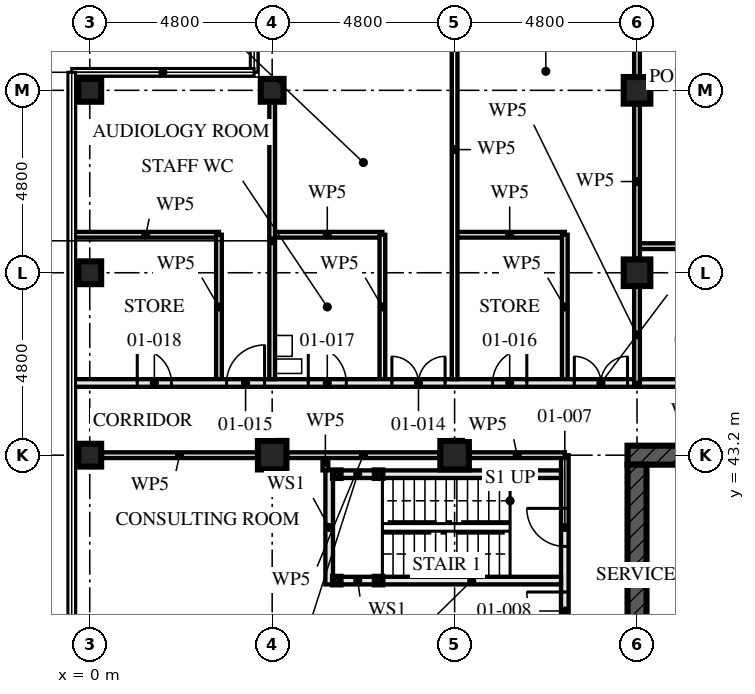
"""IFC4 building model, lengths in metres.
Left out: names, types, materials, properties, quantities, classifications, styles, units other than length and angle.
Written with IfcOpenShell. Run it as: python <this file> out.ifc"""

import sys

from ifc_helpers import new_model, si_unit, direction, frame, frame_2d, origin, origin_2d, place, context, subcontext, project, spatial, rectangle, hollow_rectangle, extrude, element, fill, save


model = new_model("IFC4")
c1 = context("Model", 3, precision=1e-05, world=origin(), true_north=direction((0.0, 1.0)))
c2 = subcontext(c1, "Body", "Model", "MODEL_VIEW")
j1 = project(units=[si_unit("LENGTHUNIT", "METRE"), si_unit("PLANEANGLEUNIT", "RADIAN")], contexts=[c1])
p1 = place(None, origin())
s1 = spatial("IfcSite", under=j1, at=p1, CompositionType="ELEMENT")
p2 = place(p1, origin())
s2 = spatial("IfcBuilding", under=s1, at=p2, CompositionType="ELEMENT")
p3 = place(p2, frame((0.0, 0.0, 4.5)))
s3 = spatial("IfcBuildingStorey", under=s2, at=p3, CompositionType="ELEMENT", Elevation=4.5)
for number, where, z_axis, x_axis in (
    (1, (0.0, 43.2, 0.0), (0.0, 0.0, 1.0), (0.0, 1.0, 0.0)),
    (2, (0.0, 48.0, 0.0), (0.0, 0.0, 1.0), (1.0, 0.0, 0.0)),
    (3, (0.0, 52.8, 0.0), (0.0, 0.0, 1.0), (0.0, 1.0, 0.0)),
):
    element("IfcColumn", number, at=place(p3, frame(where, z_axis=z_axis, x_axis=x_axis)), inside=s3, PredefinedType="COLUMN", context=c2, shape_type="SweptSolid", body=[
        extrude(hollow_rectangle(XDim=0.6, YDim=0.6, WallThickness=0.08, at=origin_2d()), origin(), (0.0, 0.0, 1.0), 4.5),
    ])
p4 = place(p3, frame((4.8, 43.2, 0.0), z_axis=(0.0, 0.0, 1.0), x_axis=(0.0, 1.0, 0.0)))
e4 = element("IfcColumn", 4, at=p4, inside=s3, PredefinedType="COLUMN", context=c2, shape_type="SweptSolid", body=[
    extrude(hollow_rectangle(XDim=0.75, YDim=0.75, WallThickness=0.08, at=origin_2d()), origin(), (0.0, 0.0, 1.0), 4.5),
])
p5 = place(p3, frame((4.8, 52.8, 0.0), z_axis=(0.0, 0.0, 1.0), x_axis=(0.0, 1.0, 0.0)))
e5 = element("IfcColumn", 5, at=p5, inside=s3, PredefinedType="COLUMN", context=c2, shape_type="SweptSolid", body=[
    extrude(hollow_rectangle(XDim=0.6, YDim=0.6, WallThickness=0.08, at=origin_2d()), origin(), (0.0, 0.0, 1.0), 4.5),
])
p6 = place(p3, frame((9.6, 43.2, 0.0), z_axis=(0.0, 0.0, 1.0), x_axis=(0.0, 1.0, 0.0)))
e6 = element("IfcColumn", 6, at=p6, inside=s3, PredefinedType="COLUMN", context=c2, shape_type="SweptSolid", body=[
    extrude(hollow_rectangle(XDim=0.75, YDim=0.75, WallThickness=0.08, at=origin_2d()), origin(), (0.0, 0.0, 1.0), 4.5),
])
for number, where, z_axis, x_axis in (
    (7, (14.4, 48.0, 0.0), (0.0, 0.0, 1.0), (1.0, 0.0, 0.0)),
    (8, (14.4, 52.8, 0.0), (0.0, 0.0, 1.0), (1.0, 0.0, 0.0)),
):
    element("IfcColumn", number, at=place(p3, frame(where, z_axis=z_axis, x_axis=x_axis)), inside=s3, PredefinedType="COLUMN", context=c2, shape_type="SweptSolid", body=[
        extrude(hollow_rectangle(XDim=0.7, YDim=0.7, WallThickness=0.06, at=origin_2d()), origin(), (0.0, 0.0, 1.0), 4.5),
    ])
p7 = place(p3, frame((29.05, 43.2, -0.17), z_axis=(0.0, 0.0, 1.0), x_axis=(-1.0, 0.0, 0.0)))
e9 = element("IfcWall", 9, at=p7, inside=s3, PredefinedType="SHEAR", context=c2, shape_type="SweptSolid", body=[
    extrude(rectangle(XDim=14.9, YDim=0.5, at=frame_2d((7.45, 0.0))), origin(), (0.0, 0.0, 1.0), 4.5),
])
p8 = place(p7, frame((6.85, 0.0, 0.17)))
e10 = element("IfcOpeningElement", 10, at=p8, cuts=e9, PredefinedType="OPENING", context=c2, shape_type="SweptSolid", body=[
    extrude(rectangle(XDim=1.2, YDim=2.1, at=frame_2d((0.6, 1.05))), frame((0.0, 0.26, 0.0), z_axis=(0.0, -1.0, 0.0), x_axis=(1.0, 0.0, 0.0)), (0.0, 0.0, 1.0), 0.521),
])
p9 = place(p3, frame((14.4, 42.95, -0.17), z_axis=(0.0, 0.0, 1.0), x_axis=(0.0, -1.0, 0.0)))
e11 = element("IfcWall", 11, at=p9, inside=s3, PredefinedType="SHEAR", context=c2, shape_type="SweptSolid", body=[
    extrude(rectangle(XDim=13.9, YDim=0.5, at=frame_2d((6.95, 0.0))), origin(), (0.0, 0.0, 1.0), 4.5),
])
p10 = place(p9, frame((6.35, 0.0, 0.17)))
e12 = element("IfcOpeningElement", 12, at=p10, cuts=e11, PredefinedType="OPENING", context=c2, shape_type="SweptSolid", body=[
    extrude(rectangle(XDim=1.2, YDim=2.1, at=frame_2d((0.6, 1.05))), frame((0.0, 0.26, 0.0), z_axis=(0.0, -1.0, 0.0), x_axis=(1.0, 0.0, 0.0)), (0.0, 0.0, 1.0), 0.521),
])
for number, where, z_axis, x_axis in (
    (13, (6.5, 42.7, 0.0), (0.0, 0.0, 1.0), (1.0, 0.0, 0.0)),
    (14, (6.5, 39.9, 0.0), (0.0, 0.0, 1.0), (1.0, 0.0, 0.0)),
    (15, (7.6, 42.7, 0.0), (0.0, 0.0, 1.0), (1.0, 0.0, 0.0)),
    (16, (7.6, 39.9, 0.0), (0.0, 0.0, 1.0), (1.0, 0.0, 0.0)),
):
    element("IfcColumn", number, at=place(p3, frame(where, z_axis=z_axis, x_axis=x_axis)), inside=s3, PredefinedType="COLUMN", context=c2, shape_type="SweptSolid", body=[
        extrude(hollow_rectangle(XDim=0.2, YDim=0.2, WallThickness=0.008, at=origin_2d()), origin(), (0.0, 0.0, 1.0), 4.33),
    ])
p11 = place(p3, frame((6.6, 42.7, 0.0), z_axis=(0.0, 0.0, 1.0), x_axis=(1.0, 0.0, 0.0)))
e17 = element("IfcWall", 17, at=p11, inside=s3, PredefinedType="SOLIDWALL", context=c2, shape_type="SweptSolid", body=[
    extrude(rectangle(XDim=0.9, YDim=0.2, at=frame_2d((0.45, 0.0))), origin(), (0.0, 0.0, 1.0), 3.99),
])
p12 = place(p3, frame((7.7, 42.7, 0.0), z_axis=(0.0, 0.0, 1.0), x_axis=(1.0, 0.0, 0.0)))
e18 = element("IfcWall", 18, at=p12, inside=s3, PredefinedType="SOLIDWALL", context=c2, shape_type="SweptSolid", body=[
    extrude(rectangle(XDim=4.7, YDim=0.2, at=frame_2d((2.35, 0.0))), origin(), (0.0, 0.0, 1.0), 3.99),
])
p13 = place(p3, frame((6.6, 39.9, 0.0), z_axis=(0.0, 0.0, 1.0), x_axis=(1.0, 0.0, 0.0)))
e19 = element("IfcWall", 19, at=p13, inside=s3, PredefinedType="SOLIDWALL", context=c2, shape_type="SweptSolid", body=[
    extrude(rectangle(XDim=0.9, YDim=0.2, at=frame_2d((0.45, 0.0))), origin(), (0.0, 0.0, 1.0), 3.99),
])
p14 = place(p3, frame((7.7, 39.9, 0.0), z_axis=(0.0, 0.0, 1.0), x_axis=(1.0, 0.0, 0.0)))
e20 = element("IfcWall", 20, at=p14, inside=s3, PredefinedType="SOLIDWALL", context=c2, shape_type="SweptSolid", body=[
    extrude(rectangle(XDim=4.7, YDim=0.2, at=frame_2d((2.35, 0.0))), origin(), (0.0, 0.0, 1.0), 3.99),
])
p15 = place(p3, frame((6.3, 42.8, 0.0), z_axis=(0.0, 0.0, 1.0), x_axis=(0.0, -1.0, 0.0)))
e21 = element("IfcWall", 21, at=p15, inside=s3, PredefinedType="SOLIDWALL", context=c2, shape_type="SweptSolid", body=[
    extrude(rectangle(XDim=3.0, YDim=0.2, at=frame_2d((1.5, 0.0))), origin(), (0.0, 0.0, 1.0), 4.33),
])
p16 = place(p3, frame((6.2, 43.2, 0.0), z_axis=(0.0, 0.0, 1.0), x_axis=(0.0, -1.0, 0.0)))
e22 = element("IfcWall", 22, at=p16, inside=s3, PredefinedType="PARTITIONING", context=c2, shape_type="SweptSolid", body=[
    extrude(rectangle(XDim=0.4, YDim=0.15, at=frame_2d((0.2, 0.0))), origin(), (0.0, 0.0, 1.0), 4.33),
])
p17 = place(p3, frame((12.5, 43.2, 0.0), z_axis=(0.0, 0.0, 1.0), x_axis=(0.0, -1.0, 0.0)))
e23 = element("IfcWall", 23, at=p17, inside=s3, PredefinedType="PARTITIONING", context=c2, shape_type="SweptSolid", body=[
    extrude(rectangle(XDim=14.4, YDim=0.2, at=frame_2d((7.2, 0.0))), origin(), (0.0, 0.0, 1.0), 3.55),
])
p18 = place(p17, frame((1.4, 0.0, 0.0)))
e24 = element("IfcOpeningElement", 24, at=p18, cuts=e23, PredefinedType="OPENING", context=c2, shape_type="SweptSolid", body=[
    extrude(rectangle(XDim=1.0, YDim=2.1, at=frame_2d((0.5, 1.05))), frame((0.0, 0.111, 0.0), z_axis=(0.0, -1.0, 0.0), x_axis=(1.0, 0.0, 0.0)), (0.0, 0.0, 1.0), 0.221),
])
p19 = place(p17, frame((3.6, 0.0, 0.0)))
e25 = element("IfcOpeningElement", 25, at=p19, cuts=e23, PredefinedType="OPENING", context=c2, shape_type="SweptSolid", body=[
    extrude(rectangle(XDim=1.0, YDim=2.4, at=frame_2d((0.5, 1.2))), frame((0.0, 0.111, 0.0), z_axis=(0.0, -1.0, 0.0), x_axis=(1.0, 0.0, 0.0)), (0.0, 0.0, 1.0), 0.221),
])
p20 = place(p17, frame((5.0, 0.0, 0.0)))
e26 = element("IfcOpeningElement", 26, at=p20, cuts=e23, PredefinedType="OPENING", context=c2, shape_type="SweptSolid", body=[
    extrude(rectangle(XDim=1.0, YDim=2.4, at=frame_2d((0.5, 1.2))), frame((0.0, 0.111, 0.0), z_axis=(0.0, -1.0, 0.0), x_axis=(1.0, 0.0, 0.0)), (0.0, 0.0, 1.0), 0.221),
])
p21 = place(p17, frame((9.8, 0.0, 0.0)))
e27 = element("IfcOpeningElement", 27, at=p21, cuts=e23, PredefinedType="OPENING", context=c2, shape_type="SweptSolid", body=[
    extrude(rectangle(XDim=1.0, YDim=2.4, at=frame_2d((0.5, 1.2))), frame((0.0, 0.111, 0.0), z_axis=(0.0, -1.0, 0.0), x_axis=(1.0, 0.0, 0.0)), (0.0, 0.0, 1.0), 0.221),
])
p22 = place(p17, frame((7.45, 0.0, 0.0)))
e28 = element("IfcOpeningElement", 28, at=p22, cuts=e23, PredefinedType="OPENING", context=c2, shape_type="SweptSolid", body=[
    extrude(rectangle(XDim=0.9, YDim=2.1, at=frame_2d((0.45, 1.05))), frame((0.0, 0.111, 0.0), z_axis=(0.0, -1.0, 0.0), x_axis=(1.0, 0.0, 0.0)), (0.0, 0.0, 1.0), 0.221),
])
p23 = place(p17, frame((12.2, 0.0, 0.0)))
e29 = element("IfcOpeningElement", 29, at=p23, cuts=e23, PredefinedType="OPENING", context=c2, shape_type="SweptSolid", body=[
    extrude(rectangle(XDim=1.0, YDim=2.1, at=frame_2d((0.5, 1.05))), frame((0.0, 0.111, 0.0), z_axis=(0.0, -1.0, 0.0), x_axis=(1.0, 0.0, 0.0)), (0.0, 0.0, 1.0), 0.221),
])
p24 = place(p3, frame((12.5, 49.0, 0.0), z_axis=(0.0, 0.0, 1.0), x_axis=(0.0, -1.0, 0.0)))
e30 = element("IfcWall", 30, at=p24, inside=s3, PredefinedType="PARTITIONING", context=c2, shape_type="SweptSolid", body=[
    extrude(rectangle(XDim=3.8, YDim=0.15, at=frame_2d((1.9, 0.0))), origin(), (0.0, 0.0, 1.0), 3.55),
])
p25 = place(p3, frame((12.5, 49.0, 0.0), z_axis=(0.0, 0.0, 1.0), x_axis=(-1.0, 0.0, 0.0)))
e31 = element("IfcWall", 31, at=p25, inside=s3, PredefinedType="PARTITIONING", context=c2, shape_type="SweptSolid", body=[
    extrude(rectangle(XDim=2.9, YDim=0.15, at=frame_2d((1.45, 0.0))), origin(), (0.0, 0.0, 1.0), 4.33),
])
p26 = place(p3, frame((7.7, 49.0, 0.0), z_axis=(0.0, 0.0, 1.0), x_axis=(0.0, -1.0, 0.0)))
e32 = element("IfcWall", 32, at=p26, inside=s3, PredefinedType="PARTITIONING", context=c2, shape_type="SweptSolid", body=[
    extrude(rectangle(XDim=3.8, YDim=0.15, at=frame_2d((1.9, 0.0))), origin(), (0.0, 0.0, 1.0), 3.55),
])
p27 = place(p3, frame((7.7, 49.0, 0.0), z_axis=(0.0, 0.0, 1.0), x_axis=(-1.0, 0.0, 0.0)))
e33 = element("IfcWall", 33, at=p27, inside=s3, PredefinedType="PARTITIONING", context=c2, shape_type="SweptSolid", body=[
    extrude(rectangle(XDim=2.9, YDim=0.15, at=frame_2d((1.45, 0.0))), origin(), (0.0, 0.0, 1.0), 4.33),
])
p28 = place(p3, frame((3.4, 49.0, 0.0), z_axis=(0.0, 0.0, 1.0), x_axis=(0.0, -1.0, 0.0)))
e34 = element("IfcWall", 34, at=p28, inside=s3, PredefinedType="PARTITIONING", context=c2, shape_type="SweptSolid", body=[
    extrude(rectangle(XDim=3.8, YDim=0.15, at=frame_2d((1.9, 0.0))), origin(), (0.0, 0.0, 1.0), 3.55),
])
p29 = place(p3, frame((3.4, 49.0, 0.0), z_axis=(0.0, 0.0, 1.0), x_axis=(-1.0, 0.0, 0.0)))
e35 = element("IfcWall", 35, at=p29, inside=s3, PredefinedType="PARTITIONING", context=c2, shape_type="SweptSolid", body=[
    extrude(rectangle(XDim=3.855, YDim=0.15, at=frame_2d((1.927, 0.0))), origin(), (0.0, 0.0, 1.0), 3.32),
])
p30 = place(p3, frame((9.6, 57.28, 0.0), z_axis=(0.0, 0.0, 1.0), x_axis=(0.0, -1.0, 0.0)))
e36 = element("IfcWall", 36, at=p30, inside=s3, PredefinedType="PARTITIONING", context=c2, shape_type="SweptSolid", body=[
    extrude(rectangle(XDim=12.08, YDim=0.15, at=frame_2d((6.04, 0.0))), origin(), (0.0, 0.0, 1.0), 3.55),
])
p31 = place(p3, frame((4.8, 52.48, 0.0), z_axis=(0.0, 0.0, 1.0), x_axis=(0.0, -1.0, 0.0)))
e37 = element("IfcWall", 37, at=p31, inside=s3, PredefinedType="PARTITIONING", context=c2, shape_type="SweptSolid", body=[
    extrude(rectangle(XDim=7.28, YDim=0.15, at=frame_2d((3.64, 0.0))), origin(), (0.0, 0.0, 1.0), 3.55),
])
p32 = place(p3, frame((14.4, 45.1, 0.0), z_axis=(0.0, 0.0, 1.0), x_axis=(-1.0, 0.0, 0.0)))
e38 = element("IfcWall", 38, at=p32, inside=s3, PredefinedType="PARTITIONING", context=c2, shape_type="SweptSolid", body=[
    extrude(rectangle(XDim=14.855, YDim=0.2, at=frame_2d((7.427, 0.0))), origin(), (0.0, 0.0, 1.0), 3.32),
])
p33 = place(p32, frame((0.25, 0.0, 0.0)))
e39 = element("IfcOpeningElement", 39, at=p33, cuts=e38, PredefinedType="OPENING", context=c2, shape_type="SweptSolid", body=[
    extrude(rectangle(XDim=1.4, YDim=2.4, at=frame_2d((0.7, 1.2))), frame((0.0, 0.111, 0.0), z_axis=(0.0, -1.0, 0.0), x_axis=(1.0, 0.0, 0.0)), (0.0, 0.0, 1.0), 0.221),
])
p34 = place(p32, frame((5.05, 0.0, 0.0)))
e40 = element("IfcOpeningElement", 40, at=p34, cuts=e38, PredefinedType="OPENING", context=c2, shape_type="SweptSolid", body=[
    extrude(rectangle(XDim=1.4, YDim=2.4, at=frame_2d((0.7, 1.2))), frame((0.0, 0.111, 0.0), z_axis=(0.0, -1.0, 0.0), x_axis=(1.0, 0.0, 0.0)), (0.0, 0.0, 1.0), 0.221),
])
p35 = place(p32, frame((9.8, 0.0, 0.0)))
e41 = element("IfcOpeningElement", 41, at=p35, cuts=e38, PredefinedType="OPENING", context=c2, shape_type="SweptSolid", body=[
    extrude(rectangle(XDim=1.0, YDim=2.4, at=frame_2d((0.5, 1.2))), frame((0.0, 0.111, 0.0), z_axis=(0.0, -1.0, 0.0), x_axis=(1.0, 0.0, 0.0)), (0.0, 0.0, 1.0), 0.221),
])
p36 = place(p32, frame((2.9, 0.0, 0.0)))
e42 = element("IfcOpeningElement", 42, at=p36, cuts=e38, PredefinedType="OPENING", context=c2, shape_type="SweptSolid", body=[
    extrude(rectangle(XDim=0.9, YDim=2.1, at=frame_2d((0.45, 1.05))), frame((0.0, 0.111, 0.0), z_axis=(0.0, -1.0, 0.0), x_axis=(1.0, 0.0, 0.0)), (0.0, 0.0, 1.0), 0.221),
])
p37 = place(p32, frame((7.65, 0.0, 0.0)))
e43 = element("IfcOpeningElement", 43, at=p37, cuts=e38, PredefinedType="OPENING", context=c2, shape_type="SweptSolid", body=[
    extrude(rectangle(XDim=1.0, YDim=2.1, at=frame_2d((0.5, 1.05))), frame((0.0, 0.111, 0.0), z_axis=(0.0, -1.0, 0.0), x_axis=(1.0, 0.0, 0.0)), (0.0, 0.0, 1.0), 0.221),
])
p38 = place(p32, frame((12.25, 0.0, 0.0)))
e44 = element("IfcOpeningElement", 44, at=p38, cuts=e38, PredefinedType="OPENING", context=c2, shape_type="SweptSolid", body=[
    extrude(rectangle(XDim=0.9, YDim=2.1, at=frame_2d((0.45, 1.05))), frame((0.0, 0.111, 0.0), z_axis=(0.0, -1.0, 0.0), x_axis=(1.0, 0.0, 0.0)), (0.0, 0.0, 1.0), 0.221),
])
p39 = place(p3, frame((17.8, 48.7, 0.0), z_axis=(0.0, 0.0, 1.0), x_axis=(-1.0, 0.0, 0.0)))
e45 = element("IfcWall", 45, at=p39, inside=s3, PredefinedType="PARTITIONING", context=c2, shape_type="SweptSolid", body=[
    extrude(rectangle(XDim=3.4, YDim=0.15, at=frame_2d((1.7, 0.0))), origin(), (0.0, 0.0, 1.0), 4.33),
])
p40 = place(p3, frame((28.8, 45.1, 0.0), z_axis=(0.0, 0.0, 1.0), x_axis=(-1.0, 0.0, 0.0)))
e46 = element("IfcWall", 46, at=p40, inside=s3, PredefinedType="PARTITIONING", context=c2, shape_type="SweptSolid", body=[
    extrude(rectangle(XDim=14.4, YDim=0.2, at=frame_2d((7.2, 0.0))), origin(), (0.0, 0.0, 1.0), 4.33),
])
p41 = place(p40, frame((0.25, 0.0, 0.0)))
e47 = element("IfcOpeningElement", 47, at=p41, cuts=e46, PredefinedType="OPENING", context=c2, shape_type="SweptSolid", body=[
    extrude(rectangle(XDim=1.4, YDim=2.4, at=frame_2d((0.7, 1.2))), frame((0.0, 0.111, 0.0), z_axis=(0.0, -1.0, 0.0), x_axis=(1.0, 0.0, 0.0)), (0.0, 0.0, 1.0), 0.221),
])
p42 = place(p40, frame((5.0, 0.0, 0.0)))
e48 = element("IfcOpeningElement", 48, at=p42, cuts=e46, PredefinedType="OPENING", context=c2, shape_type="SweptSolid", body=[
    extrude(rectangle(XDim=1.0, YDim=2.4, at=frame_2d((0.5, 1.2))), frame((0.0, 0.111, 0.0), z_axis=(0.0, -1.0, 0.0), x_axis=(1.0, 0.0, 0.0)), (0.0, 0.0, 1.0), 0.221),
])
p43 = place(p40, frame((9.8, 0.0, 0.0)))
e49 = element("IfcOpeningElement", 49, at=p43, cuts=e46, PredefinedType="OPENING", context=c2, shape_type="SweptSolid", body=[
    extrude(rectangle(XDim=1.0, YDim=2.4, at=frame_2d((0.5, 1.2))), frame((0.0, 0.111, 0.0), z_axis=(0.0, -1.0, 0.0), x_axis=(1.0, 0.0, 0.0)), (0.0, 0.0, 1.0), 0.221),
])
p44 = place(p40, frame((2.9, 0.0, 0.0)))
e50 = element("IfcOpeningElement", 50, at=p44, cuts=e46, PredefinedType="OPENING", context=c2, shape_type="SweptSolid", body=[
    extrude(rectangle(XDim=0.9, YDim=2.1, at=frame_2d((0.45, 1.05))), frame((0.0, 0.111, 0.0), z_axis=(0.0, -1.0, 0.0), x_axis=(1.0, 0.0, 0.0)), (0.0, 0.0, 1.0), 0.221),
])
p45 = place(p40, frame((7.4, 0.0, 0.0)))
e51 = element("IfcOpeningElement", 51, at=p45, cuts=e46, PredefinedType="OPENING", context=c2, shape_type="SweptSolid", body=[
    extrude(rectangle(XDim=1.0, YDim=2.1, at=frame_2d((0.5, 1.05))), frame((0.0, 0.111, 0.0), z_axis=(0.0, -1.0, 0.0), x_axis=(1.0, 0.0, 0.0)), (0.0, 0.0, 1.0), 0.221),
])
p46 = place(p40, frame((12.25, 0.0, 0.0)))
e52 = element("IfcOpeningElement", 52, at=p46, cuts=e46, PredefinedType="OPENING", context=c2, shape_type="SweptSolid", body=[
    extrude(rectangle(XDim=0.9, YDim=2.1, at=frame_2d((0.45, 1.05))), frame((0.0, 0.111, 0.0), z_axis=(0.0, -1.0, 0.0), x_axis=(1.0, 0.0, 0.0)), (0.0, 0.0, 1.0), 0.221),
])
p47 = place(p3, frame((12.5, 43.2, 0.0), z_axis=(0.0, 0.0, 1.0), x_axis=(-1.0, 0.0, 0.0)))
e53 = element("IfcWall", 53, at=p47, inside=s3, PredefinedType="PARTITIONING", context=c2, shape_type="SweptSolid", body=[
    extrude(rectangle(XDim=2.505, YDim=0.15, at=frame_2d((1.252, 0.0))), origin(), (0.0, 0.0, 1.0), 3.32),
])
p48 = place(p3, frame((9.205, 43.2, 0.0), z_axis=(0.0, 0.0, 1.0), x_axis=(-1.0, 0.0, 0.0)))
e54 = element("IfcWall", 54, at=p48, inside=s3, PredefinedType="PARTITIONING", context=c2, shape_type="SweptSolid", body=[
    extrude(rectangle(XDim=4.01, YDim=0.15, at=frame_2d((2.005, 0.0))), origin(), (0.0, 0.0, 1.0), 3.32),
])
p49 = place(p3, frame((4.405, 43.2, 0.0), z_axis=(0.0, 0.0, 1.0), x_axis=(-1.0, 0.0, 0.0)))
e55 = element("IfcWall", 55, at=p49, inside=s3, PredefinedType="PARTITIONING", context=c2, shape_type="SweptSolid", body=[
    extrude(rectangle(XDim=4.085, YDim=0.15, at=frame_2d((2.042, 0.0))), origin(), (0.0, 0.0, 1.0), 3.32),
])
p50 = place(p3, frame((14.4, 45.1, 0.0), z_axis=(0.0, 0.0, 1.0), x_axis=(0.0, 1.0, 0.0)))
e56 = element("IfcWall", 56, at=p50, inside=s3, PredefinedType="PARTITIONING", context=c2, shape_type="SweptSolid", body=[
    extrude(rectangle(XDim=2.53, YDim=0.15, at=frame_2d((1.265, 0.0))), origin(), (0.0, 0.0, 1.0), 3.32),
])
p51 = place(p3, frame((14.4, 48.37, 0.0), z_axis=(0.0, 0.0, 1.0), x_axis=(0.0, 1.0, 0.0)))
e57 = element("IfcWall", 57, at=p51, inside=s3, PredefinedType="PARTITIONING", context=c2, shape_type="SweptSolid", body=[
    extrude(rectangle(XDim=4.06, YDim=0.15, at=frame_2d((2.03, 0.0))), origin(), (0.0, 0.0, 1.0), 3.32),
])
p52 = place(p3, frame((14.4, 53.17, 0.0), z_axis=(0.0, 0.0, 1.0), x_axis=(0.0, 1.0, 0.0)))
e58 = element("IfcWall", 58, at=p52, inside=s3, PredefinedType="PARTITIONING", context=c2, shape_type="SweptSolid", body=[
    extrude(rectangle(XDim=4.11, YDim=0.15, at=frame_2d((2.055, 0.0))), origin(), (0.0, 0.0, 1.0), 3.32),
])
p53 = place(p18, frame((1.0, 0.0, 0.0), z_axis=(0.0, 0.0, 1.0), x_axis=(-1.0, 0.0, 0.0)))
e59 = element("IfcDoor", 59, at=p53, inside=s3, OperationType="SINGLE_SWING_LEFT", PredefinedType="DOOR", context=c2, shape_type="SweptSolid", body=[
    extrude(rectangle(XDim=1.0, YDim=2.1, at=frame_2d((0.5, 1.05))), frame((0.0, 0.032, 0.0), z_axis=(0.0, -1.0, 0.0), x_axis=(1.0, 0.0, 0.0)), (0.0, 0.0, 1.0), 0.064),
])
fill(e24, e59)
p54 = place(p19, frame((1.0, 0.0, 0.0), z_axis=(0.0, 0.0, 1.0), x_axis=(-1.0, 0.0, 0.0)))
e60 = element("IfcDoor", 60, at=p54, inside=s3, OperationType="SINGLE_SWING_LEFT", PredefinedType="DOOR", context=c2, shape_type="SweptSolid", body=[
    extrude(rectangle(XDim=1.0, YDim=2.4, at=frame_2d((0.5, 1.2))), frame((0.0, 0.027, 0.0), z_axis=(0.0, -1.0, 0.0), x_axis=(1.0, 0.0, 0.0)), (0.0, 0.0, 1.0), 0.054),
])
fill(e25, e60)
p55 = place(p33, frame((1.4, 0.0, 0.0), z_axis=(0.0, 0.0, 1.0), x_axis=(-1.0, 0.0, 0.0)))
e61 = element("IfcDoor", 61, at=p55, inside=s3, OperationType="DOUBLE_DOOR_SINGLE_SWING", PredefinedType="DOOR", context=c2, shape_type="SweptSolid", body=[
    extrude(rectangle(XDim=1.4, YDim=2.4, at=frame_2d((0.7, 1.2))), frame((0.0, 0.027, 0.0), z_axis=(0.0, -1.0, 0.0), x_axis=(1.0, 0.0, 0.0)), (0.0, 0.0, 1.0), 0.054),
])
fill(e39, e61)
p56 = place(p34, frame((1.4, 0.0, 0.0), z_axis=(0.0, 0.0, 1.0), x_axis=(-1.0, 0.0, 0.0)))
e62 = element("IfcDoor", 62, at=p56, inside=s3, OperationType="DOUBLE_DOOR_SINGLE_SWING", PredefinedType="DOOR", context=c2, shape_type="SweptSolid", body=[
    extrude(rectangle(XDim=1.4, YDim=2.4, at=frame_2d((0.7, 1.2))), frame((0.0, 0.027, 0.0), z_axis=(0.0, -1.0, 0.0), x_axis=(1.0, 0.0, 0.0)), (0.0, 0.0, 1.0), 0.054),
])
fill(e40, e62)
p57 = place(p35, frame((1.0, 0.0, 0.0), z_axis=(0.0, 0.0, 1.0), x_axis=(-1.0, 0.0, 0.0)))
e63 = element("IfcDoor", 63, at=p57, inside=s3, OperationType="SINGLE_SWING_LEFT", PredefinedType="DOOR", context=c2, shape_type="SweptSolid", body=[
    extrude(rectangle(XDim=1.0, YDim=2.4, at=frame_2d((0.5, 1.2))), frame((0.0, 0.027, 0.0), z_axis=(0.0, -1.0, 0.0), x_axis=(1.0, 0.0, 0.0)), (0.0, 0.0, 1.0), 0.054),
])
fill(e41, e63)
p58 = place(p36, frame((0.9, 0.0, 0.0), z_axis=(0.0, 0.0, 1.0), x_axis=(-1.0, 0.0, 0.0)))
e64 = element("IfcDoor", 64, at=p58, inside=s3, OperationType="SINGLE_SWING_LEFT", PredefinedType="DOOR", context=c2, shape_type="SweptSolid", body=[
    extrude(rectangle(XDim=0.9, YDim=2.1, at=frame_2d((0.45, 1.05))), frame((0.0, 0.027, 0.0), z_axis=(0.0, -1.0, 0.0), x_axis=(1.0, 0.0, 0.0)), (0.0, 0.0, 1.0), 0.054),
])
fill(e42, e64)
p59 = place(p37, frame((1.0, 0.0, 0.0), z_axis=(0.0, 0.0, 1.0), x_axis=(-1.0, 0.0, 0.0)))
e65 = element("IfcDoor", 65, at=p59, inside=s3, OperationType="SINGLE_SWING_RIGHT", PredefinedType="DOOR", context=c2, shape_type="SweptSolid", body=[
    extrude(rectangle(XDim=1.0, YDim=2.1, at=frame_2d((0.5, 1.05))), frame((0.0, 0.027, 0.0), z_axis=(0.0, -1.0, 0.0), x_axis=(1.0, 0.0, 0.0)), (0.0, 0.0, 1.0), 0.054),
])
fill(e43, e65)
p60 = place(p38, frame((0.9, 0.0, 0.0), z_axis=(0.0, 0.0, 1.0), x_axis=(-1.0, 0.0, 0.0)))
e66 = element("IfcDoor", 66, at=p60, inside=s3, OperationType="SINGLE_SWING_RIGHT", PredefinedType="DOOR", context=c2, shape_type="SweptSolid", body=[
    extrude(rectangle(XDim=0.9, YDim=2.1, at=frame_2d((0.45, 1.05))), frame((0.0, 0.027, 0.0), z_axis=(0.0, -1.0, 0.0), x_axis=(1.0, 0.0, 0.0)), (0.0, 0.0, 1.0), 0.054),
])
fill(e44, e66)
save(model, sys.argv[1])
